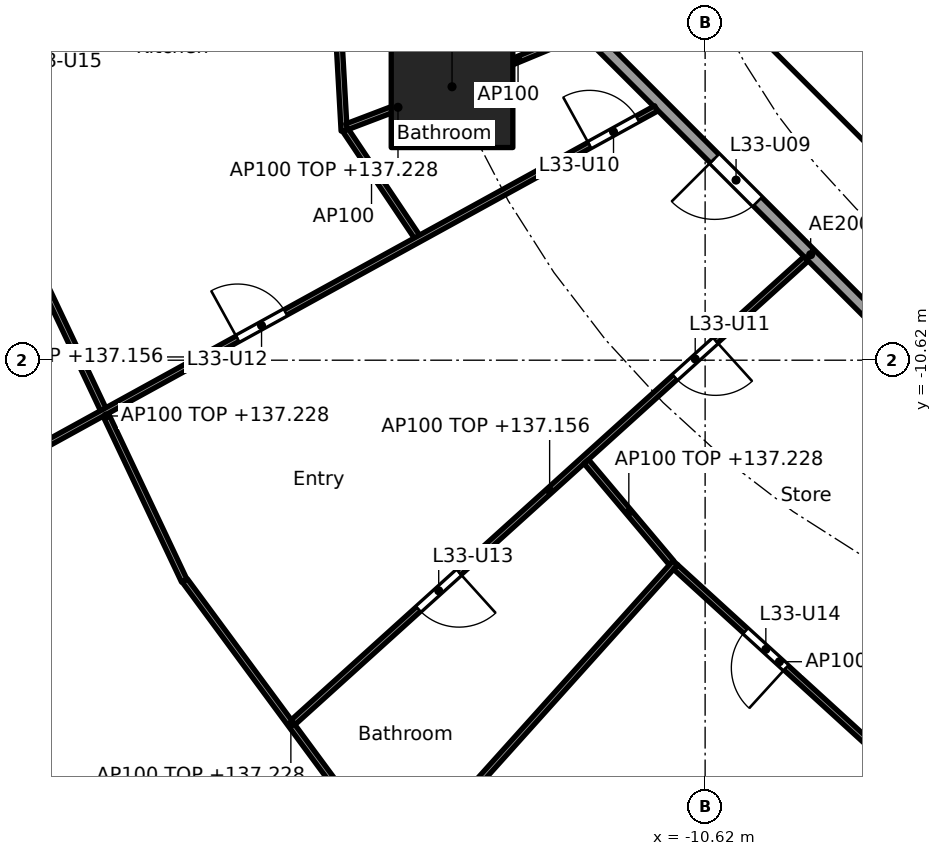
"""IFC4 building model, lengths in metres.
Left out: names, types, materials, properties, quantities, classifications, styles, units other than length and angle.
Written with IfcOpenShell. Run it as: python <this file> out.ifc"""

import sys

from ifc_helpers import new_model, si_unit, direction, frame, frame_2d, origin, origin_2d, place, context, subcontext, project, spatial, rectangle, extrude, element, fill, save


model = new_model("IFC4")
c1 = context("Model", 3, precision=1e-05, world=origin(), true_north=direction((0.0, 1.0)))
c2 = subcontext(c1, "Body", "Model", "MODEL_VIEW")
j1 = project(units=[si_unit("LENGTHUNIT", "METRE"), si_unit("PLANEANGLEUNIT", "RADIAN")], contexts=[c1])
p1 = place(None, origin())
s1 = spatial("IfcSite", under=j1, at=p1, CompositionType="ELEMENT")
p2 = place(p1, origin())
s2 = spatial("IfcBuilding", under=s1, at=p2, CompositionType="ELEMENT")
p3 = place(p2, frame((0.0, 0.0, 134.4)))
s3 = spatial("IfcBuildingStorey", under=s2, at=p3, CompositionType="ELEMENT", Elevation=134.4)
p4 = place(p3, frame((-14.782, -6.123, 0.0), z_axis=(0.0, 0.0, 1.0), x_axis=(1.0, 0.0, 0.0)))
e1 = element("IfcColumn", 1, at=p4, inside=s3, PredefinedType="COLUMN", context=c2, shape_type="SweptSolid", body=[
    extrude(rectangle(XDim=2.0, YDim=2.0, at=origin_2d()), origin(), (0.0, 0.0, 1.0), 3.7),
])
p5 = place(p3, frame((-9.988, -4.613, 0.0), z_axis=(0.0, 0.0, 1.0), x_axis=(0.707106781187, -0.707106781187, 0.0)))
e2 = element("IfcWall", 2, at=p5, inside=s3, PredefinedType="SHEAR", context=c2, shape_type="SweptSolid", body=[
    extrude(rectangle(XDim=7.602, YDim=0.6, at=frame_2d((3.801, 0.0))), origin(), (0.0, 0.0, 1.0), 3.44),
])
p6 = place(p5, frame((6.151, 0.0, 0.0)))
e3 = element("IfcOpeningElement", 3, at=p6, cuts=e2, PredefinedType="OPENING", context=c2, shape_type="SweptSolid", body=[
    extrude(rectangle(XDim=1.1, YDim=2.1, at=frame_2d((0.55, 1.05))), frame((0.0, 0.31, 0.0), z_axis=(0.0, -1.0, 0.0), x_axis=(1.0, 0.0, 0.0)), (0.0, 0.0, 1.0), 0.62),
])
p7 = place(p3, frame((-8.301, -5.8, 0.0), z_axis=(0.0, 0.0, 1.0), x_axis=(1.0, 0.0, 0.0)))
e4 = element("IfcWall", 4, at=p7, inside=s3, PredefinedType="PARTITIONING", context=c2, shape_type="SweptSolid", body=[
    extrude(rectangle(XDim=2.026, YDim=0.15, at=frame_2d((1.013, 0.0))), origin(), (0.0, 0.0, 1.0), 3.44),
])
p8 = place(p3, frame((-6.149, -14.825, 0.0), z_axis=(0.0, 0.0, 1.0), x_axis=(-0.525406383516, -0.85085141603, 0.0)))
e5 = element("IfcWall", 5, at=p8, inside=s3, PredefinedType="PARTITIONING", context=c2, shape_type="SweptSolid", body=[
    extrude(rectangle(XDim=15.925, YDim=0.2, at=frame_2d((7.962, 0.0))), origin(), (0.0, 0.0, 1.0), 2.828),
])
p9 = place(p3, frame((-12.635, -5.134, 0.0), z_axis=(0.0, 0.0, 1.0), x_axis=(0.707106781187, -0.707106781187, 0.0)))
e6 = element("IfcWall", 6, at=p9, inside=s3, PredefinedType="PARTITIONING", context=c2, shape_type="SweptSolid", body=[
    extrude(rectangle(XDim=10.609, YDim=0.2, at=frame_2d((5.305, 0.0))), origin(), (0.0, 0.0, 1.0), 3.44),
])
p10 = place(p9, frame((3.07, 0.0, 0.0)))
e7 = element("IfcOpeningElement", 7, at=p10, cuts=e6, PredefinedType="OPENING", context=c2, shape_type="SweptSolid", body=[
    extrude(rectangle(XDim=1.0, YDim=2.1, at=frame_2d((0.5, 1.05))), frame((0.0, 0.11, 0.0), z_axis=(0.0, -1.0, 0.0), x_axis=(1.0, 0.0, 0.0)), (0.0, 0.0, 1.0), 0.22),
])
p11 = place(p3, frame((-16.82, -2.158, 0.0), z_axis=(0.0, 0.0, 1.0), x_axis=(0.055967931845, -0.998432566879, 0.0)))
e8 = element("IfcWall", 8, at=p11, inside=s3, PredefinedType="PARTITIONING", context=c2, shape_type="SweptSolid", body=[
    extrude(rectangle(XDim=4.698, YDim=0.1, at=frame_2d((2.349, 0.0))), origin(), (0.0, 0.0, 1.0), 2.828),
])
p12 = place(p11, frame((1.874, 0.0, 0.0)))
e9 = element("IfcOpeningElement", 9, at=p12, cuts=e8, PredefinedType="OPENING", context=c2, shape_type="SweptSolid", body=[
    extrude(rectangle(XDim=0.9, YDim=2.1, at=frame_2d((0.45, 1.05))), frame((0.0, 0.06, 0.0), z_axis=(0.0, -1.0, 0.0), x_axis=(1.0, 0.0, 0.0)), (0.0, 0.0, 1.0), 0.12),
])
p13 = place(p3, frame((-12.657, -5.243, 0.0), z_axis=(0.0, 0.0, 1.0), x_axis=(-0.923864733477, -0.382719158442, 0.0)))
e10 = element("IfcWall", 10, at=p13, inside=s3, PredefinedType="PARTITIONING", context=c2, shape_type="SweptSolid", body=[
    extrude(rectangle(XDim=2.25, YDim=0.1, at=frame_2d((1.125, 0.0))), origin(), (0.0, 0.0, 1.0), 3.44),
])
p14 = place(p3, frame((-14.829, -6.141, 0.0), z_axis=(0.0, 0.0, 1.0), x_axis=(-0.934704367514, -0.355426146128, 0.0)))
e11 = element("IfcWall", 11, at=p14, inside=s3, PredefinedType="PARTITIONING", context=c2, shape_type="SweptSolid", body=[
    extrude(rectangle(XDim=1.802, YDim=0.1, at=frame_2d((0.901, 0.0))), origin(), (0.0, 0.0, 1.0), 2.828),
])
p15 = place(p3, frame((-16.532, -6.84, 0.0), z_axis=(0.0, 0.0, 1.0), x_axis=(0.556994773624, -0.830515997531, 0.0)))
e12 = element("IfcWall", 12, at=p15, inside=s3, PredefinedType="PARTITIONING", context=c2, shape_type="SweptSolid", body=[
    extrude(rectangle(XDim=2.183, YDim=0.1, at=frame_2d((1.092, 0.0))), origin(), (0.0, 0.0, 1.0), 3.44),
])
p16 = place(p3, frame((-21.75, -8.826, 0.0), z_axis=(0.0, 0.0, 1.0), x_axis=(0.427736419988, -0.903903509793, 0.0)))
e13 = element("IfcWall", 13, at=p16, inside=s3, PredefinedType="PARTITIONING", context=c2, shape_type="SweptSolid", body=[
    extrude(rectangle(XDim=5.999, YDim=0.1, at=frame_2d((3.0, 0.0))), origin(), (0.0, 0.0, 1.0), 2.828),
])
p17 = place(p3, frame((-11.426, -6.479, 0.0), z_axis=(0.0, 0.0, 1.0), x_axis=(-0.876110392495, -0.482110547657, 0.0)))
e14 = element("IfcWall", 14, at=p17, inside=s3, PredefinedType="PARTITIONING", context=c2, shape_type="SweptSolid", body=[
    extrude(rectangle(XDim=16.955, YDim=0.1, at=frame_2d((8.478, 0.0))), origin(), (0.0, 0.0, 1.0), 2.756),
])
p18 = place(p17, frame((0.35, 0.0, 0.0)))
e15 = element("IfcOpeningElement", 15, at=p18, cuts=e14, PredefinedType="OPENING", context=c2, shape_type="SweptSolid", body=[
    extrude(rectangle(XDim=0.9, YDim=2.1, at=frame_2d((0.45, 1.05))), frame((0.0, 0.06, 0.0), z_axis=(0.0, -1.0, 0.0), x_axis=(1.0, 0.0, 0.0)), (0.0, 0.0, 1.0), 0.12),
])
p19 = place(p17, frame((6.957, 0.0, 0.0)))
e16 = element("IfcOpeningElement", 16, at=p19, cuts=e14, PredefinedType="OPENING", context=c2, shape_type="SweptSolid", body=[
    extrude(rectangle(XDim=0.9, YDim=2.1, at=frame_2d((0.45, 1.05))), frame((0.0, 0.06, 0.0), z_axis=(0.0, -1.0, 0.0), x_axis=(1.0, 0.0, 0.0)), (0.0, 0.0, 1.0), 0.12),
])
p20 = place(p17, frame((13.206, 0.0, 0.0)))
e17 = element("IfcOpeningElement", 17, at=p20, cuts=e14, PredefinedType="OPENING", context=c2, shape_type="SweptSolid", body=[
    extrude(rectangle(XDim=0.9, YDim=2.1, at=frame_2d((0.45, 1.05))), frame((0.0, 0.06, 0.0), z_axis=(0.0, -1.0, 0.0), x_axis=(1.0, 0.0, 0.0)), (0.0, 0.0, 1.0), 0.12),
])
p21 = place(p3, frame((-19.176, -14.244, 0.0), z_axis=(0.0, 0.0, 1.0), x_axis=(0.593532053206, -0.80481035146, 0.0)))
e18 = element("IfcWall", 18, at=p21, inside=s3, PredefinedType="PARTITIONING", context=c2, shape_type="SweptSolid", body=[
    extrude(rectangle(XDim=5.876, YDim=0.1, at=frame_2d((2.938, 0.0))), origin(), (0.0, 0.0, 1.0), 2.828),
])
p22 = place(p3, frame((-8.959, -8.952, 0.0), z_axis=(0.0, 0.0, 1.0), x_axis=(-0.741982736283, -0.670418987692, 0.0)))
e19 = element("IfcWall", 19, at=p22, inside=s3, PredefinedType="PARTITIONING", context=c2, shape_type="SweptSolid", body=[
    extrude(rectangle(XDim=11.371, YDim=0.1, at=frame_2d((5.685, 0.0))), origin(), (0.0, 0.0, 1.0), 2.756),
])
p23 = place(p22, frame((2.009, 0.0, 0.0)))
e20 = element("IfcOpeningElement", 20, at=p23, cuts=e19, PredefinedType="OPENING", context=c2, shape_type="SweptSolid", body=[
    extrude(rectangle(XDim=0.9, YDim=2.1, at=frame_2d((0.45, 1.05))), frame((0.0, 0.06, 0.0), z_axis=(0.0, -1.0, 0.0), x_axis=(1.0, 0.0, 0.0)), (0.0, 0.0, 1.0), 0.12),
])
p24 = place(p22, frame((7.694, 0.0, 0.0)))
e21 = element("IfcOpeningElement", 21, at=p24, cuts=e19, PredefinedType="OPENING", context=c2, shape_type="SweptSolid", body=[
    extrude(rectangle(XDim=0.9, YDim=2.1, at=frame_2d((0.45, 1.05))), frame((0.0, 0.06, 0.0), z_axis=(0.0, -1.0, 0.0), x_axis=(1.0, 0.0, 0.0)), (0.0, 0.0, 1.0), 0.12),
])
p25 = place(p3, frame((-12.575, -12.286, 0.0), z_axis=(0.0, 0.0, 1.0), x_axis=(0.644052758448, -0.764981074495, 0.0)))
e22 = element("IfcWall", 22, at=p25, inside=s3, PredefinedType="PARTITIONING", context=c2, shape_type="SweptSolid", body=[
    extrude(rectangle(XDim=2.174, YDim=0.1, at=frame_2d((1.087, 0.0))), origin(), (0.0, 0.0, 1.0), 2.828),
])
p26 = place(p3, frame((-11.109, -13.951, 0.0), z_axis=(0.0, 0.0, 1.0), x_axis=(-0.668488676691, -0.743722319913, 0.0)))
e23 = element("IfcWall", 23, at=p26, inside=s3, PredefinedType="PARTITIONING", context=c2, shape_type="SweptSolid", body=[
    extrude(rectangle(XDim=13.094, YDim=0.1, at=frame_2d((6.547, 0.0))), origin(), (0.0, 0.0, 1.0), 2.828),
])
p27 = place(p26, frame((9.5, 0.0, 0.0)))
e24 = element("IfcOpeningElement", 24, at=p27, cuts=e23, PredefinedType="OPENING", context=c2, shape_type="SweptSolid", body=[
    extrude(rectangle(XDim=0.9, YDim=2.1, at=frame_2d((0.45, 1.05))), frame((0.0, 0.06, 0.0), z_axis=(0.0, -1.0, 0.0), x_axis=(1.0, 0.0, 0.0)), (0.0, 0.0, 1.0), 0.12),
])
p28 = place(p3, frame((-11.105, -14.021, 0.0), z_axis=(0.0, 0.0, 1.0), x_axis=(0.738880014758, -0.673837015747, 0.0)))
e25 = element("IfcWall", 25, at=p28, inside=s3, PredefinedType="PARTITIONING", context=c2, shape_type="SweptSolid", body=[
    extrude(rectangle(XDim=4.621, YDim=0.1, at=frame_2d((2.31, 0.0))), origin(), (0.0, 0.0, 1.0), 2.828),
])
p29 = place(p28, frame((1.558, 0.0, 0.0)))
e26 = element("IfcOpeningElement", 26, at=p29, cuts=e25, PredefinedType="OPENING", context=c2, shape_type="SweptSolid", body=[
    extrude(rectangle(XDim=0.9, YDim=2.1, at=frame_2d((0.45, 1.05))), frame((0.0, 0.06, 0.0), z_axis=(0.0, -1.0, 0.0), x_axis=(1.0, 0.0, 0.0)), (0.0, 0.0, 1.0), 0.12),
])
p30 = place(p10, frame((1.0, 0.0, 0.0), x_axis=(-1.0, 0.0, 0.0)))
e27 = element("IfcDoor", 27, at=p30, inside=s3, OperationType="SINGLE_SWING_RIGHT", PredefinedType="DOOR", context=c2, shape_type="SweptSolid", body=[
    extrude(rectangle(XDim=1.0, YDim=2.1, at=frame_2d((0.5, 1.05))), frame((0.0, 0.025, 0.0), z_axis=(0.0, -1.0, 0.0), x_axis=(1.0, 0.0, 0.0)), (0.0, 0.0, 1.0), 0.05),
])
fill(e7, e27)
p31 = place(p18, frame((0.9, 0.0, 0.0), x_axis=(-1.0, 0.0, 0.0)))
e28 = element("IfcDoor", 28, at=p31, inside=s3, OperationType="SINGLE_SWING_LEFT", PredefinedType="DOOR", context=c2, shape_type="SweptSolid", body=[
    extrude(rectangle(XDim=0.9, YDim=2.1, at=frame_2d((0.45, 1.05))), frame((0.0, 0.025, 0.0), z_axis=(0.0, -1.0, 0.0), x_axis=(1.0, 0.0, 0.0)), (0.0, 0.0, 1.0), 0.05),
])
fill(e15, e28)
p32 = place(p23, origin())
e29 = element("IfcDoor", 29, at=p32, inside=s3, OperationType="SINGLE_SWING_LEFT", PredefinedType="DOOR", context=c2, shape_type="SweptSolid", body=[
    extrude(rectangle(XDim=0.9, YDim=2.1, at=frame_2d((0.45, 1.05))), frame((0.0, 0.025, 0.0), z_axis=(0.0, -1.0, 0.0), x_axis=(1.0, 0.0, 0.0)), (0.0, 0.0, 1.0), 0.05),
])
fill(e20, e29)
p33 = place(p19, frame((0.9, 0.0, 0.0), x_axis=(-1.0, 0.0, 0.0)))
e30 = element("IfcDoor", 30, at=p33, inside=s3, OperationType="SINGLE_SWING_LEFT", PredefinedType="DOOR", context=c2, shape_type="SweptSolid", body=[
    extrude(rectangle(XDim=0.9, YDim=2.1, at=frame_2d((0.45, 1.05))), frame((0.0, 0.025, 0.0), z_axis=(0.0, -1.0, 0.0), x_axis=(1.0, 0.0, 0.0)), (0.0, 0.0, 1.0), 0.05),
])
fill(e16, e30)
p34 = place(p24, origin())
e31 = element("IfcDoor", 31, at=p34, inside=s3, OperationType="SINGLE_SWING_LEFT", PredefinedType="DOOR", context=c2, shape_type="SweptSolid", body=[
    extrude(rectangle(XDim=0.9, YDim=2.1, at=frame_2d((0.45, 1.05))), frame((0.0, 0.025, 0.0), z_axis=(0.0, -1.0, 0.0), x_axis=(1.0, 0.0, 0.0)), (0.0, 0.0, 1.0), 0.05),
])
fill(e21, e31)
p35 = place(p29, frame((0.9, 0.0, 0.0), x_axis=(-1.0, 0.0, 0.0)))
e32 = element("IfcDoor", 32, at=p35, inside=s3, OperationType="SINGLE_SWING_LEFT", PredefinedType="DOOR", context=c2, shape_type="SweptSolid", body=[
    extrude(rectangle(XDim=0.9, YDim=2.1, at=frame_2d((0.45, 1.05))), frame((0.0, 0.025, 0.0), z_axis=(0.0, -1.0, 0.0), x_axis=(1.0, 0.0, 0.0)), (0.0, 0.0, 1.0), 0.05),
])
fill(e26, e32)
save(model, sys.argv[1])
